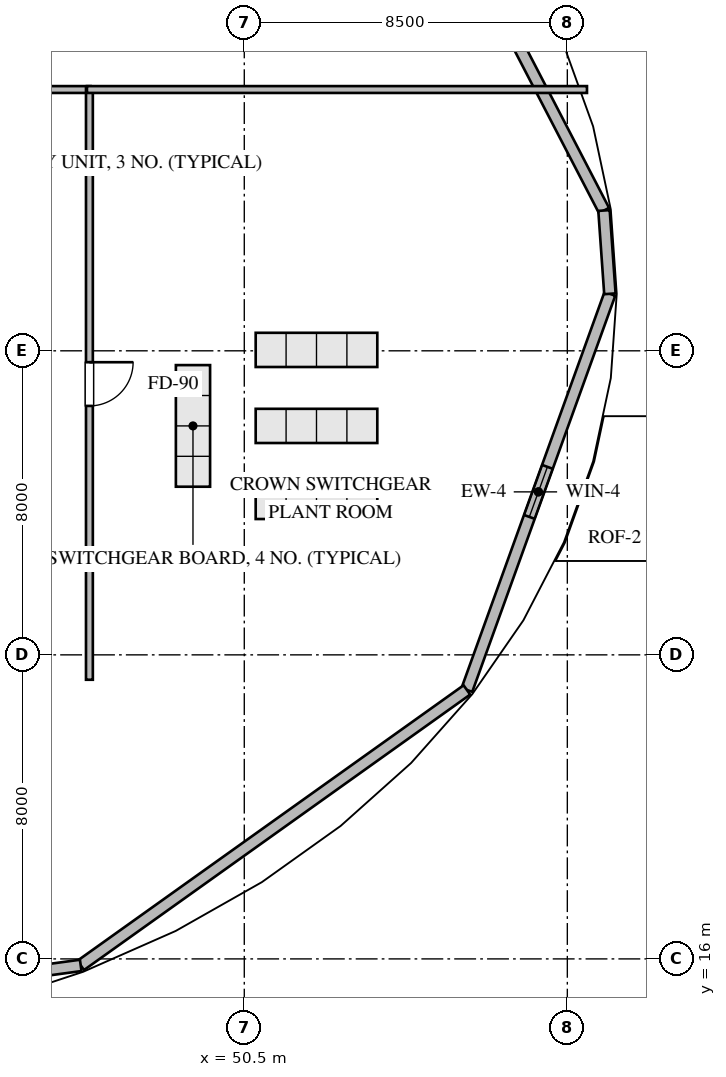
"""IFC4 building model, lengths in metres.
Left out: names, types, materials, properties, quantities, classifications, styles, units other than length and angle.
Written with IfcOpenShell. Run it as: python <this file> out.ifc"""

import sys

from ifc_helpers import new_model, si_unit, direction, frame, frame_2d, origin, place, context, subcontext, project, spatial, rectangle, extrude, element, fill, save


model = new_model("IFC4")
c1 = context("Model", 3, precision=1e-05, world=origin(), true_north=direction((0.0, 1.0)))
c2 = subcontext(c1, "Body", "Model", "MODEL_VIEW")
j1 = project(units=[si_unit("LENGTHUNIT", "METRE"), si_unit("PLANEANGLEUNIT", "RADIAN")], contexts=[c1])
p1 = place(None, origin())
s1 = spatial("IfcSite", under=j1, at=p1, CompositionType="ELEMENT")
p2 = place(p1, origin())
s2 = spatial("IfcBuilding", under=s1, at=p2, CompositionType="ELEMENT")
p3 = place(p2, frame((0.0, 0.0, 292.8)))
s3 = spatial("IfcBuildingStorey", under=s2, at=p3, CompositionType="ELEMENT", Elevation=292.8)
p4 = place(p3, frame((60.12, 33.5, 0.0), z_axis=(0.0, 0.0, 1.0), x_axis=(-0.339587618367, -0.940574425259, 0.0)))
e1 = element("IfcWall", 1, at=p4, inside=s3, PredefinedType="STANDARD", context=c2, shape_type="SweptSolid", body=[
    extrude(rectangle(XDim=11.082, YDim=0.3, at=frame_2d((5.541, 0.0))), origin(), (0.0, 0.0, 1.0), 3.72),
])
p5 = place(p4, frame((4.841, 0.0, 1.2)))
e2 = element("IfcOpeningElement", 2, at=p5, cuts=e1, PredefinedType="OPENING", context=c2, shape_type="SweptSolid", body=[
    extrude(rectangle(XDim=1.4, YDim=1.2, at=frame_2d((0.7, 0.6))), frame((0.0, 0.16, 0.0), z_axis=(0.0, -1.0, 0.0), x_axis=(1.0, 0.0, 0.0)), (0.0, 0.0, 1.0), 0.32),
])
p6 = place(p3, frame((56.357, 23.077, 0.0), z_axis=(0.0, 0.0, 1.0), x_axis=(-0.814111303181, -0.580708865123, 0.0)))
e3 = element("IfcWall", 3, at=p6, inside=s3, PredefinedType="STANDARD", context=c2, shape_type="SweptSolid", body=[
    extrude(rectangle(XDim=12.481, YDim=0.3, at=frame_2d((6.24, 0.0))), origin(), (0.0, 0.0, 1.0), 3.72),
])
p7 = place(p3, frame((46.196, 15.829, 0.0), z_axis=(0.0, 0.0, 1.0), x_axis=(-0.990927056791, -0.134400774248, 0.0)))
e4 = element("IfcWall", 4, at=p7, inside=s3, PredefinedType="STANDARD", context=c2, shape_type="SweptSolid", body=[
    extrude(rectangle(XDim=13.58, YDim=0.3, at=frame_2d((6.79, 0.0))), origin(), (0.0, 0.0, 1.0), 3.72),
])
p8 = place(p7, frame((6.09, 0.0, 1.2)))
e5 = element("IfcOpeningElement", 5, at=p8, cuts=e4, PredefinedType="OPENING", context=c2, shape_type="SweptSolid", body=[
    extrude(rectangle(XDim=1.4, YDim=1.2, at=frame_2d((0.7, 0.6))), frame((0.0, 0.16, 0.0), z_axis=(0.0, -1.0, 0.0), x_axis=(1.0, 0.0, 0.0)), (0.0, 0.0, 1.0), 0.32),
])
p9 = place(p3, frame((54.762, 45.718, 0.0), z_axis=(0.0, 0.0, 1.0), x_axis=(0.460623742834, -0.8875954977, 0.0)))
e6 = element("IfcWall", 6, at=p9, inside=s3, PredefinedType="STANDARD", context=c2, shape_type="SweptSolid", body=[
    extrude(rectangle(XDim=11.296, YDim=0.3, at=frame_2d((5.648, 0.0))), origin(), (0.0, 0.0, 1.0), 3.72),
])
p10 = place(p9, frame((4.948, 0.0, 1.2)))
e7 = element("IfcOpeningElement", 7, at=p10, cuts=e6, PredefinedType="OPENING", context=c2, shape_type="SweptSolid", body=[
    extrude(rectangle(XDim=1.4, YDim=1.2, at=frame_2d((0.7, 0.6))), frame((0.0, 0.16, 0.0), z_axis=(0.0, -1.0, 0.0), x_axis=(1.0, 0.0, 0.0)), (0.0, 0.0, 1.0), 0.32),
])
p11 = place(p3, frame((59.965, 35.692, 0.0), z_axis=(0.0, 0.0, 1.0), x_axis=(0.070552198309, -0.997508088846, 0.0)))
e8 = element("IfcWall", 8, at=p11, inside=s3, PredefinedType="STANDARD", context=c2, shape_type="SweptSolid", body=[
    extrude(rectangle(XDim=2.197, YDim=0.3, at=frame_2d((1.099, 0.0))), origin(), (0.0, 0.0, 1.0), 3.72),
])
p12 = place(p3, frame((34.435, 38.875, 0.0), z_axis=(0.0, 0.0, 1.0), x_axis=(1.0, 0.0, 0.0)))
e9 = element("IfcWall", 9, at=p12, inside=s3, PredefinedType="PARTITIONING", context=c2, shape_type="SweptSolid", body=[
    extrude(rectangle(XDim=12.02, YDim=0.18, at=frame_2d((6.01, 0.0))), origin(), (0.0, 0.0, 1.0), 3.72),
])
p13 = place(p12, frame((5.435, 0.0, 0.0)))
e10 = element("IfcOpeningElement", 10, at=p13, cuts=e9, PredefinedType="OPENING", context=c2, shape_type="SweptSolid", body=[
    extrude(rectangle(XDim=1.15, YDim=2.1, at=frame_2d((0.575, 1.05))), frame((0.0, 0.1, 0.0), z_axis=(0.0, -1.0, 0.0), x_axis=(1.0, 0.0, 0.0)), (0.0, 0.0, 1.0), 0.2),
])
p14 = place(p3, frame((46.425, 38.905, 0.0), z_axis=(0.0, 0.0, 1.0), x_axis=(0.0, -1.0, 0.0)))
e11 = element("IfcWall", 11, at=p14, inside=s3, PredefinedType="PARTITIONING", context=c2, shape_type="SweptSolid", body=[
    extrude(rectangle(XDim=15.56, YDim=0.18, at=frame_2d((7.78, 0.0))), origin(), (0.0, 0.0, 1.0), 3.72),
])
p15 = place(p14, frame((7.205, 0.0, 0.0)))
e12 = element("IfcOpeningElement", 12, at=p15, cuts=e11, PredefinedType="OPENING", context=c2, shape_type="SweptSolid", body=[
    extrude(rectangle(XDim=1.15, YDim=2.1, at=frame_2d((0.575, 1.05))), frame((0.0, 0.1, 0.0), z_axis=(0.0, -1.0, 0.0), x_axis=(1.0, 0.0, 0.0)), (0.0, 0.0, 1.0), 0.2),
])
p16 = place(p3, frame((59.517, 38.875, 0.0), z_axis=(0.0, 0.0, 1.0), x_axis=(-1.0, 0.0, 0.0)))
e13 = element("IfcWall", 13, at=p16, inside=s3, PredefinedType="PARTITIONING", context=c2, shape_type="SweptSolid", body=[
    extrude(rectangle(XDim=13.157, YDim=0.18, at=frame_2d((6.579, 0.0))), origin(), (0.0, 0.0, 1.0), 3.72),
])
p17 = place(p5, origin())
e14 = element("IfcWindow", 14, at=p17, inside=s3, PartitioningType="SINGLE_PANEL", PredefinedType="WINDOW", context=c2, shape_type="SweptSolid", body=[
    extrude(rectangle(XDim=1.4, YDim=1.2, at=frame_2d((0.7, 0.6))), frame((0.0, 0.03, 0.0), z_axis=(0.0, -1.0, 0.0), x_axis=(1.0, 0.0, 0.0)), (0.0, 0.0, 1.0), 0.06),
])
fill(e2, e14)
p18 = place(p15, origin())
e15 = element("IfcDoor", 15, at=p18, inside=s3, OperationType="SINGLE_SWING_LEFT", PredefinedType="DOOR", context=c2, shape_type="SweptSolid", body=[
    extrude(rectangle(XDim=1.15, YDim=2.1, at=frame_2d((0.575, 1.05))), frame((0.0, 0.025, 0.0), z_axis=(0.0, -1.0, 0.0), x_axis=(1.0, 0.0, 0.0)), (0.0, 0.0, 1.0), 0.05),
])
fill(e12, e15)
save(model, sys.argv[1])
